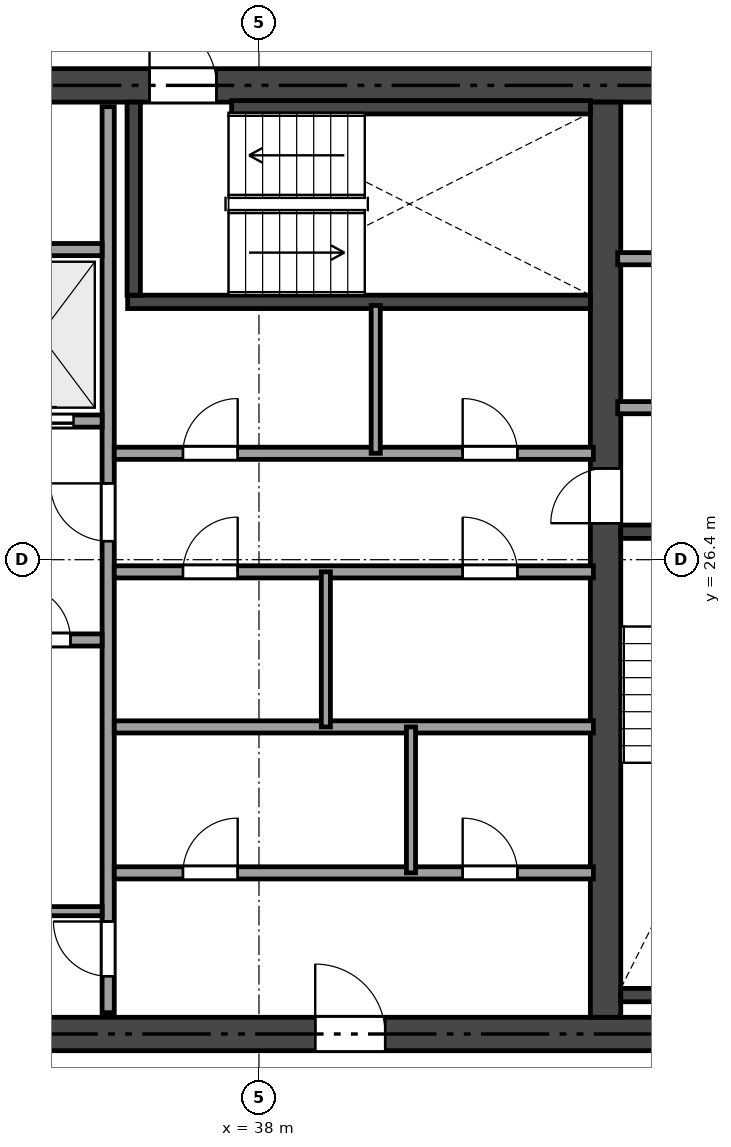
"""IFC4 building model, lengths in metres.
Left out: names, types, materials, properties, quantities, classifications, styles, units other than length and angle.
Written with IfcOpenShell. Run it as: python <this file> out.ifc"""

import sys

from ifc_helpers import new_model, si_unit, direction, frame, frame_2d, origin, place, context, subcontext, project, spatial, rectangle, extrude, element, fill, save


model = new_model("IFC4")
c1 = context("Model", 3, precision=1e-05, world=origin(), true_north=direction((0.0, 1.0)))
c2 = subcontext(c1, "Body", "Model", "MODEL_VIEW")
j1 = project(units=[si_unit("LENGTHUNIT", "METRE"), si_unit("PLANEANGLEUNIT", "RADIAN")], contexts=[c1])
p1 = place(None, origin())
s1 = spatial("IfcSite", under=j1, at=p1, CompositionType="ELEMENT")
p2 = place(p1, origin())
s2 = spatial("IfcBuilding", under=s1, at=p2, CompositionType="ELEMENT")
p3 = place(p2, frame((0.0, 0.0, 286.7)))
s3 = spatial("IfcBuildingStorey", under=s2, at=p3, CompositionType="ELEMENT", Elevation=286.7)
p4 = place(p3, frame((26.525, 18.6, 0.0), z_axis=(0.0, 0.0, 1.0), x_axis=(1.0, 0.0, 0.0)))
e1 = element("IfcWall", 1, at=p4, inside=s3, PredefinedType="SHEAR", context=c2, shape_type="SweptSolid", body=[
    extrude(rectangle(XDim=21.35, YDim=0.55, at=frame_2d((10.675, 0.0))), origin(), (0.0, 0.0, 1.0), 2.78),
])
p5 = place(p4, frame((12.4, 0.0, 0.0)))
e2 = element("IfcOpeningElement", 2, at=p5, cuts=e1, PredefinedType="OPENING", context=c2, shape_type="SweptSolid", body=[
    extrude(rectangle(XDim=1.15, YDim=2.15, at=frame_2d((0.575, 1.075))), frame((0.0, 0.285, 0.0), z_axis=(0.0, -1.0, 0.0), x_axis=(1.0, 0.0, 0.0)), (0.0, 0.0, 1.0), 0.57),
])
p6 = place(p4, frame((5.225, 0.0, 0.0)))
e3 = element("IfcOpeningElement", 3, at=p6, cuts=e1, PredefinedType="OPENING", context=c2, shape_type="SweptSolid", body=[
    extrude(rectangle(XDim=0.9, YDim=2.1, at=frame_2d((0.45, 1.05))), frame((0.0, 0.285, 0.0), z_axis=(0.0, -1.0, 0.0), x_axis=(1.0, 0.0, 0.0)), (0.0, 0.0, 1.0), 0.57),
])
p7 = place(p3, frame((26.525, 34.2, 0.0), z_axis=(0.0, 0.0, 1.0), x_axis=(1.0, 0.0, 0.0)))
e4 = element("IfcWall", 4, at=p7, inside=s3, PredefinedType="SHEAR", context=c2, shape_type="SweptSolid", body=[
    extrude(rectangle(XDim=21.35, YDim=0.55, at=frame_2d((10.675, 0.0))), origin(), (0.0, 0.0, 1.0), 2.78),
])
p8 = place(p7, frame((9.675, 0.0, 0.0)))
e5 = element("IfcOpeningElement", 5, at=p8, cuts=e4, PredefinedType="OPENING", context=c2, shape_type="SweptSolid", body=[
    extrude(rectangle(XDim=1.1, YDim=2.15, at=frame_2d((0.55, 1.075))), frame((0.0, 0.285, 0.0), z_axis=(0.0, -1.0, 0.0), x_axis=(1.0, 0.0, 0.0)), (0.0, 0.0, 1.0), 0.57),
])
p9 = place(p7, frame((1.925, 0.0, 0.0)))
e6 = element("IfcOpeningElement", 6, at=p9, cuts=e4, PredefinedType="OPENING", context=c2, shape_type="SweptSolid", body=[
    extrude(rectangle(XDim=0.9, YDim=2.1, at=frame_2d((0.45, 1.05))), frame((0.0, 0.285, 0.0), z_axis=(0.0, -1.0, 0.0), x_axis=(1.0, 0.0, 0.0)), (0.0, 0.0, 1.0), 0.57),
])
p10 = place(p7, frame((6.225, 0.0, 0.0)))
e7 = element("IfcOpeningElement", 7, at=p10, cuts=e4, PredefinedType="OPENING", context=c2, shape_type="SweptSolid", body=[
    extrude(rectangle(XDim=0.9, YDim=2.1, at=frame_2d((0.45, 1.05))), frame((0.0, 0.285, 0.0), z_axis=(0.0, -1.0, 0.0), x_axis=(1.0, 0.0, 0.0)), (0.0, 0.0, 1.0), 0.57),
])
p11 = place(p3, frame((43.7, 18.875, 0.0), z_axis=(0.0, 0.0, 1.0), x_axis=(0.0, 1.0, 0.0)))
e8 = element("IfcWall", 8, at=p11, inside=s3, PredefinedType="SHEAR", context=c2, shape_type="SweptSolid", body=[
    extrude(rectangle(XDim=15.05, YDim=0.5, at=frame_2d((7.525, 0.0))), origin(), (0.0, 0.0, 1.0), 2.78),
])
p12 = place(p11, frame((8.125, 0.0, 0.0)))
e9 = element("IfcOpeningElement", 9, at=p12, cuts=e8, PredefinedType="OPENING", context=c2, shape_type="SweptSolid", body=[
    extrude(rectangle(XDim=0.9, YDim=2.1, at=frame_2d((0.45, 1.05))), frame((0.0, 0.26, 0.0), z_axis=(0.0, -1.0, 0.0), x_axis=(1.0, 0.0, 0.0)), (0.0, 0.0, 1.0), 0.52),
])
for number, where, z_axis, x_axis in (
    (10, (43.95, 26.86, 0.0), (0.0, 0.0, 1.0), (1.0, 0.0, 0.0)),
    (11, (43.95, 19.24, 0.0), (0.0, 0.0, 1.0), (1.0, 0.0, 0.0)),
):
    element("IfcWall", number, at=place(p3, frame(where, z_axis=z_axis, x_axis=x_axis)), inside=s3, PredefinedType="SHEAR", context=c2, shape_type="SweptSolid", body=[
        extrude(rectangle(XDim=3.375, YDim=0.22, at=frame_2d((1.688, 0.0))), origin(), (0.0, 0.0, 1.0), 2.78),
    ])
p13 = place(p3, frame((35.84, 30.64, 0.0), z_axis=(0.0, 0.0, 1.0), x_axis=(1.0, 0.0, 0.0)))
e12 = element("IfcWall", 12, at=p13, inside=s3, PredefinedType="SHEAR", context=c2, shape_type="SweptSolid", body=[
    extrude(rectangle(XDim=7.61, YDim=0.22, at=frame_2d((3.805, 0.0))), origin(), (0.0, 0.0, 1.0), 2.78),
])
p14 = place(p3, frame((35.94, 30.75, 0.0), z_axis=(0.0, 0.0, 1.0), x_axis=(0.0, 1.0, 0.0)))
e13 = element("IfcWall", 13, at=p14, inside=s3, PredefinedType="SHEAR", context=c2, shape_type="SweptSolid", body=[
    extrude(rectangle(XDim=3.175, YDim=0.22, at=frame_2d((1.587, 0.0))), origin(), (0.0, 0.0, 1.0), 2.78),
])
p15 = place(p3, frame((37.55, 33.84, 0.0), z_axis=(0.0, 0.0, 1.0), x_axis=(1.0, 0.0, 0.0)))
e14 = element("IfcWall", 14, at=p15, inside=s3, PredefinedType="SHEAR", context=c2, shape_type="SweptSolid", body=[
    extrude(rectangle(XDim=5.9, YDim=0.22, at=frame_2d((2.95, 0.0))), origin(), (0.0, 0.0, 1.0), 2.78),
])
p16 = place(p3, frame((43.9, 28.9, 0.0), z_axis=(0.0, 0.0, 1.0), x_axis=(1.0, 0.0, 0.0)))
e15 = element("IfcWall", 15, at=p16, inside=s3, PredefinedType="SOLIDWALL", context=c2, shape_type="SweptSolid", body=[
    extrude(rectangle(XDim=3.35, YDim=0.2, at=frame_2d((1.675, 0.0))), origin(), (0.0, 0.0, 1.0), 2.78),
])
p17 = place(p16, frame((1.15, 0.0, 0.0)))
e16 = element("IfcOpeningElement", 16, at=p17, cuts=e15, PredefinedType="OPENING", context=c2, shape_type="SweptSolid", body=[
    extrude(rectangle(XDim=0.9, YDim=2.1, at=frame_2d((0.45, 1.05))), frame((0.0, 0.11, 0.0), z_axis=(0.0, -1.0, 0.0), x_axis=(1.0, 0.0, 0.0)), (0.0, 0.0, 1.0), 0.22),
])
p18 = place(p3, frame((43.9, 31.35, 0.0), z_axis=(0.0, 0.0, 1.0), x_axis=(1.0, 0.0, 0.0)))
e17 = element("IfcWall", 17, at=p18, inside=s3, PredefinedType="SOLIDWALL", context=c2, shape_type="SweptSolid", body=[
    extrude(rectangle(XDim=3.35, YDim=0.2, at=frame_2d((1.675, 0.0))), origin(), (0.0, 0.0, 1.0), 2.78),
])
p19 = place(p3, frame((35.52, 18.95, 0.0), z_axis=(0.0, 0.0, 1.0), x_axis=(0.0, 1.0, 0.0)))
e18 = element("IfcWall", 18, at=p19, inside=s3, PredefinedType="SOLIDWALL", context=c2, shape_type="SweptSolid", body=[
    extrude(rectangle(XDim=14.9, YDim=0.2, at=frame_2d((7.45, 0.0))), origin(), (0.0, 0.0, 1.0), 2.301),
])
p20 = place(p19, frame((7.755, 0.0, 0.0)))
e19 = element("IfcOpeningElement", 19, at=p20, cuts=e18, PredefinedType="OPENING", context=c2, shape_type="SweptSolid", body=[
    extrude(rectangle(XDim=0.95, YDim=2.15, at=frame_2d((0.475, 1.075))), frame((0.0, 0.11, 0.0), z_axis=(0.0, -1.0, 0.0), x_axis=(1.0, 0.0, 0.0)), (0.0, 0.0, 1.0), 0.22),
])
p21 = place(p19, frame((0.6, 0.0, 0.0)))
e20 = element("IfcOpeningElement", 20, at=p21, cuts=e18, PredefinedType="OPENING", context=c2, shape_type="SweptSolid", body=[
    extrude(rectangle(XDim=0.9, YDim=2.1, at=frame_2d((0.45, 1.05))), frame((0.0, 0.11, 0.0), z_axis=(0.0, -1.0, 0.0), x_axis=(1.0, 0.0, 0.0)), (0.0, 0.0, 1.0), 0.22),
])
p22 = place(p3, frame((31.0, 28.68, 0.0), z_axis=(0.0, 0.0, 1.0), x_axis=(1.0, 0.0, 0.0)))
e21 = element("IfcWall", 21, at=p22, inside=s3, PredefinedType="SOLIDWALL", context=c2, shape_type="SweptSolid", body=[
    extrude(rectangle(XDim=4.42, YDim=0.2, at=frame_2d((2.21, 0.0))), origin(), (0.0, 0.0, 1.0), 2.78),
])
p23 = place(p22, frame((0.6, 0.0, 0.0)))
e22 = element("IfcOpeningElement", 22, at=p23, cuts=e21, PredefinedType="OPENING", context=c2, shape_type="SweptSolid", body=[
    extrude(rectangle(XDim=1.1, YDim=2.15, at=frame_2d((0.55, 1.075))), frame((0.0, 0.11, 0.0), z_axis=(0.0, -1.0, 0.0), x_axis=(1.0, 0.0, 0.0)), (0.0, 0.0, 1.0), 0.22),
])
p24 = place(p22, frame((2.85, 0.0, 0.0)))
e23 = element("IfcOpeningElement", 23, at=p24, cuts=e21, PredefinedType="OPENING", context=c2, shape_type="SweptSolid", body=[
    extrude(rectangle(XDim=1.1, YDim=2.15, at=frame_2d((0.55, 1.075))), frame((0.0, 0.11, 0.0), z_axis=(0.0, -1.0, 0.0), x_axis=(1.0, 0.0, 0.0)), (0.0, 0.0, 1.0), 0.22),
])
p25 = place(p3, frame((31.0, 31.5, 0.0), z_axis=(0.0, 0.0, 1.0), x_axis=(1.0, 0.0, 0.0)))
e24 = element("IfcWall", 24, at=p25, inside=s3, PredefinedType="SOLIDWALL", context=c2, shape_type="SweptSolid", body=[
    extrude(rectangle(XDim=4.42, YDim=0.2, at=frame_2d((2.21, 0.0))), origin(), (0.0, 0.0, 1.0), 2.78),
])
p26 = place(p3, frame((31.0, 25.08, 0.0), z_axis=(0.0, 0.0, 1.0), x_axis=(1.0, 0.0, 0.0)))
e25 = element("IfcWall", 25, at=p26, inside=s3, PredefinedType="SOLIDWALL", context=c2, shape_type="SweptSolid", body=[
    extrude(rectangle(XDim=4.42, YDim=0.2, at=frame_2d((2.21, 0.0))), origin(), (0.0, 0.0, 1.0), 2.78),
])
p27 = place(p26, frame((3.0, 0.0, 0.0)))
e26 = element("IfcOpeningElement", 26, at=p27, cuts=e25, PredefinedType="OPENING", context=c2, shape_type="SweptSolid", body=[
    extrude(rectangle(XDim=0.9, YDim=2.1, at=frame_2d((0.45, 1.05))), frame((0.0, 0.11, 0.0), z_axis=(0.0, -1.0, 0.0), x_axis=(1.0, 0.0, 0.0)), (0.0, 0.0, 1.0), 0.22),
])
p28 = place(p26, frame((0.62, 0.0, 0.0)))
e27 = element("IfcOpeningElement", 27, at=p28, cuts=e25, PredefinedType="OPENING", context=c2, shape_type="SweptSolid", body=[
    extrude(rectangle(XDim=1.2, YDim=2.15, at=frame_2d((0.6, 1.075))), frame((0.0, 0.11, 0.0), z_axis=(0.0, -1.0, 0.0), x_axis=(1.0, 0.0, 0.0)), (0.0, 0.0, 1.0), 0.22),
])
p29 = place(p3, frame((33.42, 20.62, 0.0), z_axis=(0.0, 0.0, 1.0), x_axis=(1.0, 0.0, 0.0)))
e28 = element("IfcWall", 28, at=p29, inside=s3, PredefinedType="PARTITIONING", context=c2, shape_type="SweptSolid", body=[
    extrude(rectangle(XDim=2.0, YDim=0.15, at=frame_2d((1.0, 0.0))), origin(), (0.0, 0.0, 1.0), 2.78),
])
p30 = place(p3, frame((35.62, 28.15, 0.0), z_axis=(0.0, 0.0, 1.0), x_axis=(1.0, 0.0, 0.0)))
e29 = element("IfcWall", 29, at=p30, inside=s3, PredefinedType="SOLIDWALL", context=c2, shape_type="SweptSolid", body=[
    extrude(rectangle(XDim=7.88, YDim=0.2, at=frame_2d((3.94, 0.0))), origin(), (0.0, 0.0, 1.0), 2.78),
])
p31 = place(p30, frame((1.13, 0.0, 0.0)))
e30 = element("IfcOpeningElement", 30, at=p31, cuts=e29, PredefinedType="OPENING", context=c2, shape_type="SweptSolid", body=[
    extrude(rectangle(XDim=0.9, YDim=2.1, at=frame_2d((0.45, 1.05))), frame((0.0, 0.11, 0.0), z_axis=(0.0, -1.0, 0.0), x_axis=(1.0, 0.0, 0.0)), (0.0, 0.0, 1.0), 0.22),
])
p32 = place(p30, frame((5.73, 0.0, 0.0)))
e31 = element("IfcOpeningElement", 31, at=p32, cuts=e29, PredefinedType="OPENING", context=c2, shape_type="SweptSolid", body=[
    extrude(rectangle(XDim=0.9, YDim=2.1, at=frame_2d((0.45, 1.05))), frame((0.0, 0.11, 0.0), z_axis=(0.0, -1.0, 0.0), x_axis=(1.0, 0.0, 0.0)), (0.0, 0.0, 1.0), 0.22),
])
p33 = place(p3, frame((35.62, 26.2, 0.0), z_axis=(0.0, 0.0, 1.0), x_axis=(1.0, 0.0, 0.0)))
e32 = element("IfcWall", 32, at=p33, inside=s3, PredefinedType="SOLIDWALL", context=c2, shape_type="SweptSolid", body=[
    extrude(rectangle(XDim=7.88, YDim=0.2, at=frame_2d((3.94, 0.0))), origin(), (0.0, 0.0, 1.0), 2.78),
])
p34 = place(p33, frame((1.13, 0.0, 0.0)))
e33 = element("IfcOpeningElement", 33, at=p34, cuts=e32, PredefinedType="OPENING", context=c2, shape_type="SweptSolid", body=[
    extrude(rectangle(XDim=0.9, YDim=2.1, at=frame_2d((0.45, 1.05))), frame((0.0, 0.11, 0.0), z_axis=(0.0, -1.0, 0.0), x_axis=(1.0, 0.0, 0.0)), (0.0, 0.0, 1.0), 0.22),
])
p35 = place(p33, frame((5.73, 0.0, 0.0)))
e34 = element("IfcOpeningElement", 34, at=p35, cuts=e32, PredefinedType="OPENING", context=c2, shape_type="SweptSolid", body=[
    extrude(rectangle(XDim=0.9, YDim=2.1, at=frame_2d((0.45, 1.05))), frame((0.0, 0.11, 0.0), z_axis=(0.0, -1.0, 0.0), x_axis=(1.0, 0.0, 0.0)), (0.0, 0.0, 1.0), 0.22),
])
p36 = place(p3, frame((35.62, 23.65, 0.0), z_axis=(0.0, 0.0, 1.0), x_axis=(1.0, 0.0, 0.0)))
e35 = element("IfcWall", 35, at=p36, inside=s3, PredefinedType="SOLIDWALL", context=c2, shape_type="SweptSolid", body=[
    extrude(rectangle(XDim=7.88, YDim=0.2, at=frame_2d((3.94, 0.0))), origin(), (0.0, 0.0, 1.0), 2.301),
])
p37 = place(p3, frame((35.62, 21.25, 0.0), z_axis=(0.0, 0.0, 1.0), x_axis=(1.0, 0.0, 0.0)))
e36 = element("IfcWall", 36, at=p37, inside=s3, PredefinedType="SOLIDWALL", context=c2, shape_type="SweptSolid", body=[
    extrude(rectangle(XDim=7.88, YDim=0.2, at=frame_2d((3.94, 0.0))), origin(), (0.0, 0.0, 1.0), 2.78),
])
p38 = place(p37, frame((1.13, 0.0, 0.0)))
e37 = element("IfcOpeningElement", 37, at=p38, cuts=e36, PredefinedType="OPENING", context=c2, shape_type="SweptSolid", body=[
    extrude(rectangle(XDim=0.9, YDim=2.1, at=frame_2d((0.45, 1.05))), frame((0.0, 0.11, 0.0), z_axis=(0.0, -1.0, 0.0), x_axis=(1.0, 0.0, 0.0)), (0.0, 0.0, 1.0), 0.22),
])
p39 = place(p37, frame((5.73, 0.0, 0.0)))
e38 = element("IfcOpeningElement", 38, at=p39, cuts=e36, PredefinedType="OPENING", context=c2, shape_type="SweptSolid", body=[
    extrude(rectangle(XDim=0.9, YDim=2.1, at=frame_2d((0.45, 1.05))), frame((0.0, 0.11, 0.0), z_axis=(0.0, -1.0, 0.0), x_axis=(1.0, 0.0, 0.0)), (0.0, 0.0, 1.0), 0.22),
])
p40 = place(p3, frame((39.92, 28.15, 0.0), z_axis=(0.0, 0.0, 1.0), x_axis=(0.0, 1.0, 0.0)))
e39 = element("IfcWall", 39, at=p40, inside=s3, PredefinedType="PARTITIONING", context=c2, shape_type="SweptSolid", body=[
    extrude(rectangle(XDim=2.43, YDim=0.15, at=frame_2d((1.215, 0.0))), origin(), (0.0, 0.0, 1.0), 2.78),
])
p41 = place(p3, frame((39.1, 23.65, 0.0), z_axis=(0.0, 0.0, 1.0), x_axis=(0.0, 1.0, 0.0)))
e40 = element("IfcWall", 40, at=p41, inside=s3, PredefinedType="PARTITIONING", context=c2, shape_type="SweptSolid", body=[
    extrude(rectangle(XDim=2.55, YDim=0.15, at=frame_2d((1.275, 0.0))), origin(), (0.0, 0.0, 1.0), 2.301),
])
p42 = place(p3, frame((40.5, 21.25, 0.0), z_axis=(0.0, 0.0, 1.0), x_axis=(0.0, 1.0, 0.0)))
e41 = element("IfcWall", 41, at=p42, inside=s3, PredefinedType="PARTITIONING", context=c2, shape_type="SweptSolid", body=[
    extrude(rectangle(XDim=2.4, YDim=0.15, at=frame_2d((1.2, 0.0))), origin(), (0.0, 0.0, 1.0), 2.301),
])
p43 = place(p8, origin())
e42 = element("IfcDoor", 42, at=p43, inside=s3, OperationType="SINGLE_SWING_LEFT", PredefinedType="DOOR", context=c2, shape_type="SweptSolid", body=[
    extrude(rectangle(XDim=1.1, YDim=2.15, at=frame_2d((0.55, 1.075))), frame((0.0, 0.025, 0.0), z_axis=(0.0, -1.0, 0.0), x_axis=(1.0, 0.0, 0.0)), (0.0, 0.0, 1.0), 0.05),
])
fill(e5, e42)
p44 = place(p20, origin())
e43 = element("IfcDoor", 43, at=p44, inside=s3, OperationType="SINGLE_SWING_RIGHT", PredefinedType="DOOR", context=c2, shape_type="SweptSolid", body=[
    extrude(rectangle(XDim=0.95, YDim=2.15, at=frame_2d((0.475, 1.075))), frame((0.0, 0.025, 0.0), z_axis=(0.0, -1.0, 0.0), x_axis=(1.0, 0.0, 0.0)), (0.0, 0.0, 1.0), 0.05),
])
fill(e19, e43)
p45 = place(p12, origin())
e44 = element("IfcDoor", 44, at=p45, inside=s3, OperationType="SINGLE_SWING_LEFT", PredefinedType="DOOR", context=c2, shape_type="SweptSolid", body=[
    extrude(rectangle(XDim=0.9, YDim=2.1, at=frame_2d((0.45, 1.05))), frame((0.0, 0.025, 0.0), z_axis=(0.0, -1.0, 0.0), x_axis=(1.0, 0.0, 0.0)), (0.0, 0.0, 1.0), 0.05),
])
fill(e9, e44)
p46 = place(p5, origin())
e45 = element("IfcDoor", 45, at=p46, inside=s3, OperationType="SINGLE_SWING_LEFT", PredefinedType="DOOR", context=c2, shape_type="SweptSolid", body=[
    extrude(rectangle(XDim=1.15, YDim=2.15, at=frame_2d((0.575, 1.075))), frame((0.0, 0.025, 0.0), z_axis=(0.0, -1.0, 0.0), x_axis=(1.0, 0.0, 0.0)), (0.0, 0.0, 1.0), 0.05),
])
fill(e2, e45)
p47 = place(p21, origin())
e46 = element("IfcDoor", 46, at=p47, inside=s3, OperationType="SINGLE_SWING_RIGHT", PredefinedType="DOOR", context=c2, shape_type="SweptSolid", body=[
    extrude(rectangle(XDim=0.9, YDim=2.1, at=frame_2d((0.45, 1.05))), frame((0.0, 0.025, 0.0), z_axis=(0.0, -1.0, 0.0), x_axis=(1.0, 0.0, 0.0)), (0.0, 0.0, 1.0), 0.05),
])
fill(e20, e46)
p48 = place(p27, origin())
e47 = element("IfcDoor", 47, at=p48, inside=s3, OperationType="SINGLE_SWING_LEFT", PredefinedType="DOOR", context=c2, shape_type="SweptSolid", body=[
    extrude(rectangle(XDim=0.9, YDim=2.1, at=frame_2d((0.45, 1.05))), frame((0.0, 0.025, 0.0), z_axis=(0.0, -1.0, 0.0), x_axis=(1.0, 0.0, 0.0)), (0.0, 0.0, 1.0), 0.05),
])
fill(e26, e47)
p49 = place(p38, origin())
e48 = element("IfcDoor", 48, at=p49, inside=s3, OperationType="SINGLE_SWING_RIGHT", PredefinedType="DOOR", context=c2, shape_type="SweptSolid", body=[
    extrude(rectangle(XDim=0.9, YDim=2.1, at=frame_2d((0.45, 1.05))), frame((0.0, 0.025, 0.0), z_axis=(0.0, -1.0, 0.0), x_axis=(1.0, 0.0, 0.0)), (0.0, 0.0, 1.0), 0.05),
])
fill(e37, e48)
p50 = place(p39, origin())
e49 = element("IfcDoor", 49, at=p50, inside=s3, OperationType="SINGLE_SWING_LEFT", PredefinedType="DOOR", context=c2, shape_type="SweptSolid", body=[
    extrude(rectangle(XDim=0.9, YDim=2.1, at=frame_2d((0.45, 1.05))), frame((0.0, 0.025, 0.0), z_axis=(0.0, -1.0, 0.0), x_axis=(1.0, 0.0, 0.0)), (0.0, 0.0, 1.0), 0.05),
])
fill(e38, e49)
p51 = place(p34, origin())
e50 = element("IfcDoor", 50, at=p51, inside=s3, OperationType="SINGLE_SWING_RIGHT", PredefinedType="DOOR", context=c2, shape_type="SweptSolid", body=[
    extrude(rectangle(XDim=0.9, YDim=2.1, at=frame_2d((0.45, 1.05))), frame((0.0, 0.025, 0.0), z_axis=(0.0, -1.0, 0.0), x_axis=(1.0, 0.0, 0.0)), (0.0, 0.0, 1.0), 0.05),
])
fill(e33, e50)
p52 = place(p35, origin())
e51 = element("IfcDoor", 51, at=p52, inside=s3, OperationType="SINGLE_SWING_LEFT", PredefinedType="DOOR", context=c2, shape_type="SweptSolid", body=[
    extrude(rectangle(XDim=0.9, YDim=2.1, at=frame_2d((0.45, 1.05))), frame((0.0, 0.025, 0.0), z_axis=(0.0, -1.0, 0.0), x_axis=(1.0, 0.0, 0.0)), (0.0, 0.0, 1.0), 0.05),
])
fill(e34, e51)
p53 = place(p31, origin())
e52 = element("IfcDoor", 52, at=p53, inside=s3, OperationType="SINGLE_SWING_RIGHT", PredefinedType="DOOR", context=c2, shape_type="SweptSolid", body=[
    extrude(rectangle(XDim=0.9, YDim=2.1, at=frame_2d((0.45, 1.05))), frame((0.0, 0.025, 0.0), z_axis=(0.0, -1.0, 0.0), x_axis=(1.0, 0.0, 0.0)), (0.0, 0.0, 1.0), 0.05),
])
fill(e30, e52)
p54 = place(p32, origin())
e53 = element("IfcDoor", 53, at=p54, inside=s3, OperationType="SINGLE_SWING_LEFT", PredefinedType="DOOR", context=c2, shape_type="SweptSolid", body=[
    extrude(rectangle(XDim=0.9, YDim=2.1, at=frame_2d((0.45, 1.05))), frame((0.0, 0.025, 0.0), z_axis=(0.0, -1.0, 0.0), x_axis=(1.0, 0.0, 0.0)), (0.0, 0.0, 1.0), 0.05),
])
fill(e31, e53)
p55 = place(p24, origin())
e54 = element("IfcDoor", 54, at=p55, inside=s3, OperationType="SLIDING_TO_LEFT", PredefinedType="DOOR", context=c2, shape_type="SweptSolid", body=[
    extrude(rectangle(XDim=1.1, YDim=2.15, at=frame_2d((0.55, 1.075))), frame((0.0, 0.025, 0.0), z_axis=(0.0, -1.0, 0.0), x_axis=(1.0, 0.0, 0.0)), (0.0, 0.0, 1.0), 0.05),
])
fill(e23, e54)
save(model, sys.argv[1])
